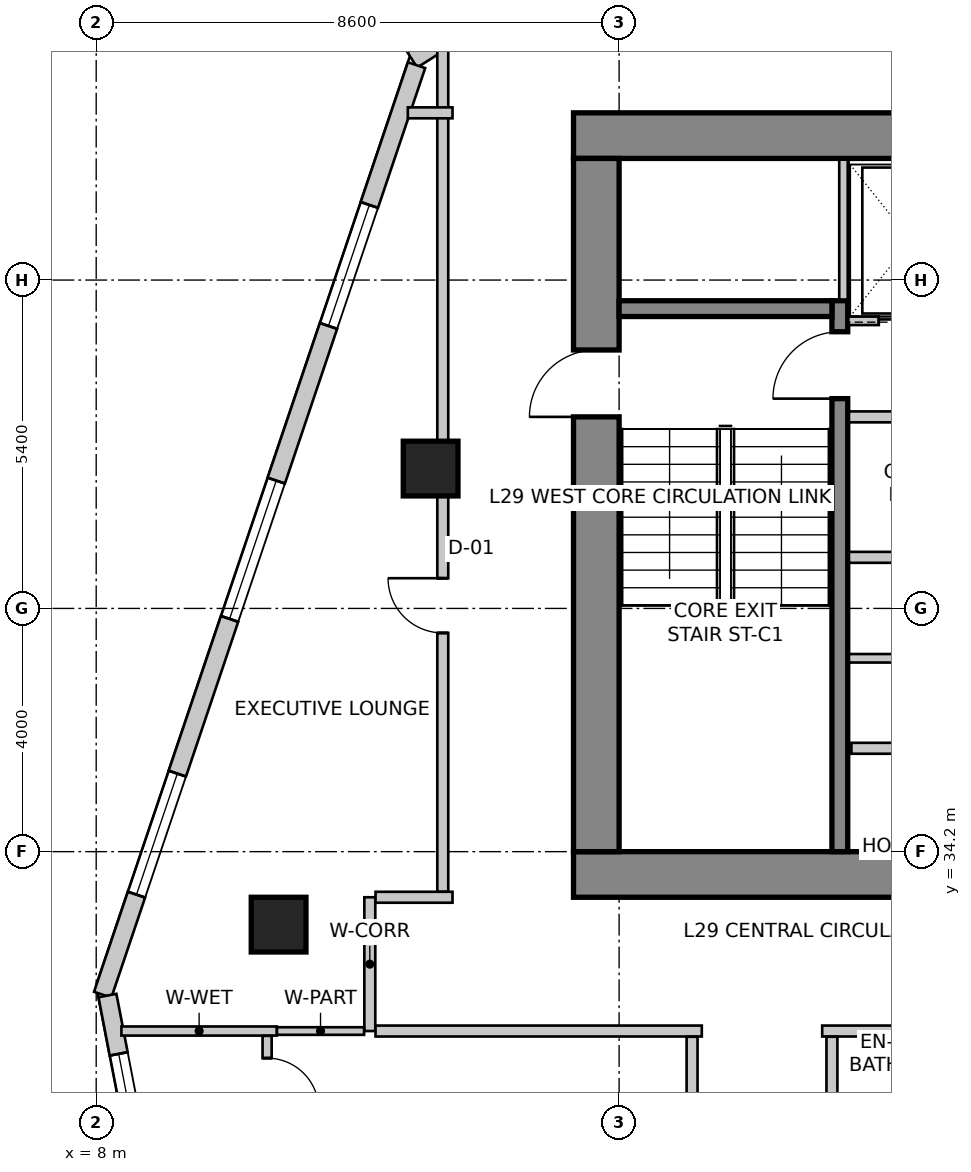
"""IFC4 building model, lengths in metres.
Left out: names, types, materials, properties, quantities, classifications, styles, units other than length and angle.
Written with IfcOpenShell. Run it as: python <this file> out.ifc"""

import sys

from ifc_helpers import new_model, si_unit, direction, frame, frame_2d, origin, origin_2d, place, context, subcontext, project, spatial, rectangle, extrude, source, transform, mapped, element, fill, save


model = new_model("IFC4")
c1 = context("Model", 3, precision=1e-05, world=origin(), true_north=direction((0.0, 1.0)))
c2 = subcontext(c1, "Body", "Model", "MODEL_VIEW")
j1 = project(units=[si_unit("LENGTHUNIT", "METRE"), si_unit("PLANEANGLEUNIT", "RADIAN")], contexts=[c1])
p1 = place(None, origin())
s1 = spatial("IfcSite", under=j1, at=p1, CompositionType="ELEMENT")
p2 = place(p1, origin())
s2 = spatial("IfcBuilding", under=s1, at=p2, CompositionType="ELEMENT")
p3 = place(p2, frame((0.0, 0.0, 121.4)))
s3 = spatial("IfcBuildingStorey", under=s2, at=p3, CompositionType="ELEMENT", Elevation=121.4)
p4 = place(p3, frame((15.85, 45.975, 0.0), z_axis=(0.0, 0.0, 1.0), x_axis=(1.0, 0.0, 0.0)))
e1 = element("IfcWall", 1, at=p4, inside=s3, PredefinedType="SHEAR", context=c2, shape_type="SweptSolid", body=[
    extrude(rectangle(XDim=15.9, YDim=0.75, at=frame_2d((7.95, 0.0))), origin(), (0.0, 0.0, 1.0), 3.6),
])
p5 = place(p3, frame((15.85, 33.825, 0.0), z_axis=(0.0, 0.0, 1.0), x_axis=(1.0, 0.0, 0.0)))
e2 = element("IfcWall", 2, at=p5, inside=s3, PredefinedType="SHEAR", context=c2, shape_type="SweptSolid", body=[
    extrude(rectangle(XDim=15.9, YDim=0.75, at=frame_2d((7.95, 0.0))), origin(), (0.0, 0.0, 1.0), 3.6),
])
m1 = source(origin(), c2, "Body", "SweptSolid", [
    extrude(rectangle(XDim=1.3, YDim=2.15, at=frame_2d((0.65, 1.075))), frame((0.0, 0.385, 0.0), z_axis=(0.0, -1.0, 0.0), x_axis=(1.0, 0.0, 0.0)), (0.0, 0.0, 1.0), 0.77),
])
p6 = place(p5, frame((10.08, 0.0, 0.0)))
e3 = element("IfcOpeningElement", 3, at=p6, cuts=e2, PredefinedType="OPENING", context=c2, shape_type="MappedRepresentation", body=[
    mapped(m1, transform((0.0, 0.0, 0.0), scale=1.0)),
])
p7 = place(p3, frame((16.225, 34.2, 0.0), z_axis=(0.0, 0.0, 1.0), x_axis=(0.0, 1.0, 0.0)))
e4 = element("IfcWall", 4, at=p7, inside=s3, PredefinedType="SHEAR", context=c2, shape_type="SweptSolid", body=[
    extrude(rectangle(XDim=11.4, YDim=0.75, at=frame_2d((5.7, 0.0))), origin(), (0.0, 0.0, 1.0), 3.6),
])
m2 = source(origin(), c2, "Body", "SweptSolid", [
    extrude(rectangle(XDim=1.1, YDim=2.15, at=frame_2d((0.55, 1.075))), frame((0.0, 0.385, 0.0), z_axis=(0.0, -1.0, 0.0), x_axis=(1.0, 0.0, 0.0)), (0.0, 0.0, 1.0), 0.77),
])
p8 = place(p7, frame((7.15, 0.0, 0.0)))
e5 = element("IfcOpeningElement", 5, at=p8, cuts=e4, PredefinedType="OPENING", context=c2, shape_type="MappedRepresentation", body=[
    mapped(m2, transform((0.0, 0.0, 0.0), scale=1.0)),
])
p9 = place(p3, frame((20.23, 34.2, 0.0), z_axis=(0.0, 0.0, 1.0), x_axis=(0.0, 1.0, 0.0)))
e6 = element("IfcWall", 6, at=p9, inside=s3, PredefinedType="SHEAR", context=c2, shape_type="SweptSolid", body=[
    extrude(rectangle(XDim=9.06, YDim=0.26, at=frame_2d((4.53, 0.0))), origin(), (0.0, 0.0, 1.0), 3.6),
])
m3 = source(origin(), c2, "Body", "SweptSolid", [
    extrude(rectangle(XDim=1.1, YDim=2.15, at=frame_2d((0.55, 1.075))), frame((0.0, 0.14, 0.0), z_axis=(0.0, -1.0, 0.0), x_axis=(1.0, 0.0, 0.0)), (0.0, 0.0, 1.0), 0.28),
])
p10 = place(p9, frame((7.45, 0.0, 0.0)))
e7 = element("IfcOpeningElement", 7, at=p10, cuts=e6, PredefinedType="OPENING", context=c2, shape_type="MappedRepresentation", body=[
    mapped(m3, transform((0.0, 0.0, 0.0), scale=1.0)),
])
p11 = place(p3, frame((16.6, 43.13, 0.0), z_axis=(0.0, 0.0, 1.0), x_axis=(1.0, 0.0, 0.0)))
e8 = element("IfcWall", 8, at=p11, inside=s3, PredefinedType="SHEAR", context=c2, shape_type="SweptSolid", body=[
    extrude(rectangle(XDim=3.5, YDim=0.26, at=frame_2d((1.75, 0.0))), origin(), (0.0, 0.0, 1.0), 3.6),
])
m4 = source(origin(), c2, "Body", "SweptSolid", [
    extrude(rectangle(XDim=0.9, YDim=0.9, at=origin_2d()), origin(), (0.0, 0.0, 1.0), 3.6),
])
for number, where, z_axis, x_axis in (
    (9, (11.0, 33.0, 0.0), (0.0, 0.0, 1.0), (1.0, 0.0, 0.0)),
    (10, (13.5, 40.5, 0.0), (0.0, 0.0, 1.0), (1.0, 0.0, 0.0)),
):
    element("IfcColumn", number, at=place(p3, frame(where, z_axis=z_axis, x_axis=x_axis)), inside=s3, PredefinedType="COLUMN", context=c2, shape_type="MappedRepresentation", body=[
        mapped(m4, transform((0.0, 0.0, 0.0), scale=1.0)),
    ])
p12 = place(p3, frame((21.875, 52.742, 0.0), z_axis=(0.0, 0.0, 1.0), x_axis=(-0.843662465249, -0.536873956092, 0.0)))
e11 = element("IfcWall", 11, at=p12, inside=s3, PredefinedType="SOLIDWALL", context=c2, shape_type="SweptSolid", body=[
    extrude(rectangle(XDim=10.284, YDim=0.3, at=frame_2d((5.142, 0.0))), origin(), (0.0, 0.0, 1.0), 3.35),
])
m5 = source(origin(), c2, "Body", "SweptSolid", [
    extrude(rectangle(XDim=2.4, YDim=2.2, at=frame_2d((1.2, 1.1))), frame((0.0, 0.16, 0.0), z_axis=(0.0, -1.0, 0.0), x_axis=(1.0, 0.0, 0.0)), (0.0, 0.0, 1.0), 0.32),
])
p13 = place(p12, frame((2.656, 0.0, 0.85)))
e12 = element("IfcOpeningElement", 12, at=p13, cuts=e11, PredefinedType="OPENING", context=c2, shape_type="MappedRepresentation", body=[
    mapped(m5, transform((0.0, 0.0, 0.0), scale=1.0)),
])
m6 = source(origin(), c2, "Body", "SweptSolid", [
    extrude(rectangle(XDim=1.5, YDim=1.8, at=frame_2d((0.75, 0.9))), frame((0.0, 0.16, 0.0), z_axis=(0.0, -1.0, 0.0), x_axis=(1.0, 0.0, 0.0)), (0.0, 0.0, 1.0), 0.32),
])
p14 = place(p12, frame((7.937, 0.0, 0.85)))
e13 = element("IfcOpeningElement", 13, at=p14, cuts=e11, PredefinedType="OPENING", context=c2, shape_type="MappedRepresentation", body=[
    mapped(m6, transform((0.0, 0.0, 0.0), scale=1.0)),
])
p15 = place(p3, frame((13.269, 47.134, 0.0), z_axis=(0.0, 0.0, 1.0), x_axis=(-0.319929596295, -0.947441319246, 0.0)))
e14 = element("IfcWall", 14, at=p15, inside=s3, PredefinedType="SOLIDWALL", context=c2, shape_type="SweptSolid", body=[
    extrude(rectangle(XDim=16.134, YDim=0.3, at=frame_2d((8.067, 0.0))), origin(), (0.0, 0.0, 1.0), 3.35),
])
m7 = source(origin(), c2, "Body", "SweptSolid", [
    extrude(rectangle(XDim=2.1, YDim=2.0, at=frame_2d((1.05, 1.0))), frame((0.0, 0.16, 0.0), z_axis=(0.0, -1.0, 0.0), x_axis=(1.0, 0.0, 0.0)), (0.0, 0.0, 1.0), 0.32),
])
p16 = place(p15, frame((2.426, 0.0, 0.85)))
e15 = element("IfcOpeningElement", 15, at=p16, cuts=e14, PredefinedType="OPENING", context=c2, shape_type="MappedRepresentation", body=[
    mapped(m7, transform((0.0, 0.0, 0.0), scale=1.0)),
])
p17 = place(p15, frame((7.211, 0.0, 0.85)))
e16 = element("IfcOpeningElement", 16, at=p17, cuts=e14, PredefinedType="OPENING", context=c2, shape_type="MappedRepresentation", body=[
    mapped(m5, transform((0.0, 0.0, 0.0), scale=1.0)),
])
p18 = place(p15, frame((12.297, 0.0, 0.85)))
e17 = element("IfcOpeningElement", 17, at=p18, cuts=e14, PredefinedType="OPENING", context=c2, shape_type="MappedRepresentation", body=[
    mapped(m7, transform((0.0, 0.0, 0.0), scale=1.0)),
])
p19 = place(p3, frame((8.185, 31.834, 0.0), z_axis=(0.0, 0.0, 1.0), x_axis=(0.189707113148, -0.981840725994, 0.0)))
e18 = element("IfcWall", 18, at=p19, inside=s3, PredefinedType="SOLIDWALL", context=c2, shape_type="SweptSolid", body=[
    extrude(rectangle(XDim=21.221, YDim=0.3, at=frame_2d((10.611, 0.0))), origin(), (0.0, 0.0, 1.0), 3.35),
])
m8 = source(origin(), c2, "Body", "SweptSolid", [
    extrude(rectangle(XDim=1.6, YDim=2.15, at=frame_2d((0.8, 1.075))), frame((0.0, 0.16, 0.0), z_axis=(0.0, -1.0, 0.0), x_axis=(1.0, 0.0, 0.0)), (0.0, 0.0, 1.0), 0.32),
])
p20 = place(p19, frame((10.441, 0.0, 0.0)))
e19 = element("IfcOpeningElement", 19, at=p20, cuts=e18, PredefinedType="OPENING", context=c2, shape_type="MappedRepresentation", body=[
    mapped(m8, transform((0.0, 0.0, 0.0), scale=1.0)),
])
p21 = place(p19, frame((0.977, 0.0, 0.85)))
e20 = element("IfcOpeningElement", 20, at=p21, cuts=e18, PredefinedType="OPENING", context=c2, shape_type="MappedRepresentation", body=[
    mapped(m6, transform((0.0, 0.0, 0.0), scale=1.0)),
])
p22 = place(p19, frame((4.219, 0.0, 0.85)))
e21 = element("IfcOpeningElement", 21, at=p22, cuts=e18, PredefinedType="OPENING", context=c2, shape_type="MappedRepresentation", body=[
    mapped(m5, transform((0.0, 0.0, 0.0), scale=1.0)),
])
p23 = place(p19, frame((8.259, 0.0, 0.85)))
e22 = element("IfcOpeningElement", 22, at=p23, cuts=e18, PredefinedType="OPENING", context=c2, shape_type="MappedRepresentation", body=[
    mapped(m6, transform((0.0, 0.0, 0.0), scale=1.0)),
])
p24 = place(p19, frame((12.842, 0.0, 0.85)))
e23 = element("IfcOpeningElement", 23, at=p24, cuts=e18, PredefinedType="OPENING", context=c2, shape_type="MappedRepresentation", body=[
    mapped(m6, transform((0.0, 0.0, 0.0), scale=1.0)),
])
p25 = place(p19, frame((16.661, 0.0, 0.85)))
e24 = element("IfcOpeningElement", 24, at=p25, cuts=e18, PredefinedType="OPENING", context=c2, shape_type="MappedRepresentation", body=[
    mapped(m5, transform((0.0, 0.0, 0.0), scale=1.0)),
])
p26 = place(p3, frame((20.37, 42.93, 0.0), z_axis=(0.0, 0.0, 1.0), x_axis=(1.0, 0.0, 0.0)))
e25 = element("IfcWall", 25, at=p26, inside=s3, PredefinedType="SOLIDWALL", context=c2, shape_type="SweptSolid", body=[
    extrude(rectangle(XDim=6.86, YDim=0.14, at=frame_2d((3.43, 0.0))), origin(), (0.0, 0.0, 1.0), 3.35),
])
m9 = source(origin(), c2, "Body", "SweptSolid", [
    extrude(rectangle(XDim=1.1, YDim=2.15, at=frame_2d((0.55, 1.075))), frame((0.0, 0.08, 0.0), z_axis=(0.0, -1.0, 0.0), x_axis=(1.0, 0.0, 0.0)), (0.0, 0.0, 1.0), 0.16),
])
p27 = place(p26, frame((0.5, 0.0, 0.0)))
e26 = element("IfcOpeningElement", 26, at=p27, cuts=e25, PredefinedType="OPENING", context=c2, shape_type="MappedRepresentation", body=[
    mapped(m9, transform((0.0, 0.0, 0.0), scale=1.0)),
])
p28 = place(p26, frame((2.7, 0.0, 0.0)))
e27 = element("IfcOpeningElement", 27, at=p28, cuts=e25, PredefinedType="OPENING", context=c2, shape_type="MappedRepresentation", body=[
    mapped(m9, transform((0.0, 0.0, 0.0), scale=1.0)),
])
p29 = place(p26, frame((5.1, 0.0, 0.0)))
e28 = element("IfcOpeningElement", 28, at=p29, cuts=e25, PredefinedType="OPENING", context=c2, shape_type="MappedRepresentation", body=[
    mapped(m9, transform((0.0, 0.0, 0.0), scale=1.0)),
])
p30 = place(p3, frame((20.29, 43.28, 0.0), z_axis=(0.0, 0.0, 1.0), x_axis=(0.0, 1.0, 0.0)))
e29 = element("IfcWall", 29, at=p30, inside=s3, PredefinedType="SOLIDWALL", context=c2, shape_type="SweptSolid", body=[
    extrude(rectangle(XDim=2.3, YDim=0.14, at=frame_2d((1.15, 0.0))), origin(), (0.0, 0.0, 1.0), 3.35),
])
p31 = place(p3, frame((20.38, 37.38, 0.0), z_axis=(0.0, 0.0, 1.0), x_axis=(1.0, 0.0, 0.0)))
e30 = element("IfcWall", 30, at=p31, inside=s3, PredefinedType="SOLIDWALL", context=c2, shape_type="SweptSolid", body=[
    extrude(rectangle(XDim=5.75, YDim=0.14, at=frame_2d((2.875, 0.0))), origin(), (0.0, 0.0, 1.0), 3.35),
])
p32 = place(p3, frame((20.38, 39.04, 0.0), z_axis=(0.0, 0.0, 1.0), x_axis=(1.0, 0.0, 0.0)))
e31 = element("IfcWall", 31, at=p32, inside=s3, PredefinedType="SOLIDWALL", context=c2, shape_type="SweptSolid", body=[
    extrude(rectangle(XDim=5.75, YDim=0.18, at=frame_2d((2.875, 0.0))), origin(), (0.0, 0.0, 1.0), 3.35),
])
p33 = place(p3, frame((24.81, 41.35, 0.0), z_axis=(0.0, 0.0, 1.0), x_axis=(-1.0, 0.0, 0.0)))
e32 = element("IfcWall", 32, at=p33, inside=s3, PredefinedType="PARTITIONING", context=c2, shape_type="SweptSolid", body=[
    extrude(rectangle(XDim=4.43, YDim=0.18, at=frame_2d((2.215, 0.0))), origin(), (0.0, 0.0, 1.0), 3.35),
])
p34 = place(p3, frame((20.42, 35.9, 0.0), z_axis=(0.0, 0.0, 1.0), x_axis=(1.0, 0.0, 0.0)))
e33 = element("IfcWall", 33, at=p34, inside=s3, PredefinedType="PARTITIONING", context=c2, shape_type="SweptSolid", body=[
    extrude(rectangle(XDim=2.62, YDim=0.18, at=frame_2d((1.31, 0.0))), origin(), (0.0, 0.0, 1.0), 3.35),
])
m10 = source(origin(), c2, "Body", "SweptSolid", [
    extrude(rectangle(XDim=0.9, YDim=2.15, at=frame_2d((0.45, 1.075))), frame((0.0, 0.1, 0.0), z_axis=(0.0, -1.0, 0.0), x_axis=(1.0, 0.0, 0.0)), (0.0, 0.0, 1.0), 0.2),
])
p35 = place(p34, frame((0.796, 0.0, 0.0)))
e34 = element("IfcOpeningElement", 34, at=p35, cuts=e33, PredefinedType="OPENING", context=c2, shape_type="MappedRepresentation", body=[
    mapped(m10, transform((0.0, 0.0, 0.0), scale=1.0)),
])
p36 = place(p3, frame((12.5, 31.25, 0.0), z_axis=(0.0, 0.0, 1.0), x_axis=(0.0, 1.0, 0.0)))
e35 = element("IfcWall", 35, at=p36, inside=s3, PredefinedType="PARTITIONING", context=c2, shape_type="SweptSolid", body=[
    extrude(rectangle(XDim=2.2, YDim=0.18, at=frame_2d((1.1, 0.0))), origin(), (0.0, 0.0, 1.0), 3.034),
])
p37 = place(p3, frame((12.594, 33.45, 0.0), z_axis=(0.0, 0.0, 1.0), x_axis=(1.0, 0.0, 0.0)))
e36 = element("IfcWall", 36, at=p37, inside=s3, PredefinedType="PARTITIONING", context=c2, shape_type="SweptSolid", body=[
    extrude(rectangle(XDim=1.266, YDim=0.18, at=frame_2d((0.633, 0.0))), origin(), (0.0, 0.0, 1.0), 3.35),
])
p38 = place(p3, frame((17.96, 31.25, 0.0), z_axis=(0.0, 0.0, 1.0), x_axis=(-1.0, 0.0, 0.0)))
e37 = element("IfcWall", 37, at=p38, inside=s3, PredefinedType="PARTITIONING", context=c2, shape_type="SweptSolid", body=[
    extrude(rectangle(XDim=5.366, YDim=0.18, at=frame_2d((2.683, 0.0))), origin(), (0.0, 0.0, 1.0), 3.034),
])
p39 = place(p3, frame((22.66, 31.25, 0.0), z_axis=(0.0, 0.0, 1.0), x_axis=(-1.0, 0.0, 0.0)))
e38 = element("IfcWall", 38, at=p39, inside=s3, PredefinedType="PARTITIONING", context=c2, shape_type="SweptSolid", body=[
    extrude(rectangle(XDim=2.72, YDim=0.18, at=frame_2d((1.36, 0.0))), origin(), (0.0, 0.0, 1.0), 3.034),
])
p40 = place(p3, frame((13.7, 33.544, 0.0), z_axis=(0.0, 0.0, 1.0), x_axis=(0.0, 1.0, 0.0)))
e39 = element("IfcWall", 39, at=p40, inside=s3, PredefinedType="PARTITIONING", context=c2, shape_type="SweptSolid", body=[
    extrude(rectangle(XDim=13.86, YDim=0.18, at=frame_2d((6.93, 0.0))), origin(), (0.0, 0.0, 1.0), 2.492),
])
p41 = place(p40, frame((4.253, 0.0, 0.0)))
e40 = element("IfcOpeningElement", 40, at=p41, cuts=e39, PredefinedType="OPENING", context=c2, shape_type="MappedRepresentation", body=[
    mapped(m10, transform((0.0, 0.0, 0.0), scale=1.0)),
])
p42 = place(p3, frame((13.86, 46.35, 0.0), z_axis=(0.0, 0.0, 1.0), x_axis=(-1.0, 0.0, 0.0)))
e41 = element("IfcWall", 41, at=p42, inside=s3, PredefinedType="PARTITIONING", context=c2, shape_type="SweptSolid", body=[
    extrude(rectangle(XDim=0.735, YDim=0.18, at=frame_2d((0.367, 0.0))), origin(), (0.0, 0.0, 1.0), 3.35),
])
p43 = place(p3, frame((10.971, 31.25, 0.0), z_axis=(0.0, 0.0, 1.0), x_axis=(-1.0, 0.0, 0.0)))
e42 = element("IfcWall", 42, at=p43, inside=s3, PredefinedType="PARTITIONING", context=c2, shape_type="SweptSolid", body=[
    extrude(rectangle(XDim=2.556, YDim=0.15, at=frame_2d((1.278, 0.0))), origin(), (0.0, 0.0, 1.0), 2.492),
])
p44 = place(p3, frame((12.406, 31.25, 0.0), z_axis=(0.0, 0.0, 1.0), x_axis=(-1.0, 0.0, 0.0)))
e43 = element("IfcWall", 43, at=p44, inside=s3, PredefinedType="PARTITIONING", context=c2, shape_type="SweptSolid", body=[
    extrude(rectangle(XDim=1.433, YDim=0.125, at=frame_2d((0.717, 0.0))), origin(), (0.0, 0.0, 1.0), 2.492),
])
p45 = place(p3, frame((17.8, 24.162, 0.0), z_axis=(0.0, 0.0, 1.0), x_axis=(0.0, 1.0, 0.0)))
e44 = element("IfcWall", 44, at=p45, inside=s3, PredefinedType="PARTITIONING", context=c2, shape_type="SweptSolid", body=[
    extrude(rectangle(XDim=6.994, YDim=0.18, at=frame_2d((3.497, 0.0))), origin(), (0.0, 0.0, 1.0), 2.803),
])
p46 = place(p45, frame((3.047, 0.0, 0.0)))
e45 = element("IfcOpeningElement", 45, at=p46, cuts=e44, PredefinedType="OPENING", context=c2, shape_type="MappedRepresentation", body=[
    mapped(m10, transform((0.0, 0.0, 0.0), scale=1.0)),
])
p47 = place(p3, frame((20.1, 31.156, 0.0), z_axis=(0.0, 0.0, 1.0), x_axis=(0.0, -1.0, 0.0)))
e46 = element("IfcWall", 46, at=p47, inside=s3, PredefinedType="PARTITIONING", context=c2, shape_type="SweptSolid", body=[
    extrude(rectangle(XDim=2.266, YDim=0.18, at=frame_2d((1.133, 0.0))), origin(), (0.0, 0.0, 1.0), 3.034),
])
p48 = place(p3, frame((10.811, 31.171, 0.0), z_axis=(0.0, 0.0, 1.0), x_axis=(0.0, -1.0, 0.0)))
e47 = element("IfcWall", 47, at=p48, inside=s3, PredefinedType="PARTITIONING", context=c2, shape_type="SweptSolid", body=[
    extrude(rectangle(XDim=2.101, YDim=0.15, at=frame_2d((1.05, 0.0))), origin(), (0.0, 0.0, 1.0), 2.492),
])
m11 = source(origin(), c2, "Body", "SweptSolid", [
    extrude(rectangle(XDim=0.85, YDim=2.15, at=frame_2d((0.425, 1.075))), frame((0.0, 0.085, 0.0), z_axis=(0.0, -1.0, 0.0), x_axis=(1.0, 0.0, 0.0)), (0.0, 0.0, 1.0), 0.17),
])
p49 = place(p48, frame((0.366, 0.0, 0.0)))
e48 = element("IfcOpeningElement", 48, at=p49, cuts=e47, PredefinedType="OPENING", context=c2, shape_type="MappedRepresentation", body=[
    mapped(m11, transform((0.0, 0.0, 0.0), scale=1.0)),
])
m12 = source(origin(), c2, "Body", "SweptSolid", [
    extrude(rectangle(XDim=2.1, YDim=2.0, at=frame_2d((1.05, 1.0))), frame((0.0, -0.015, 0.0), z_axis=(0.0, -1.0, 0.0), x_axis=(1.0, 0.0, 0.0)), (0.0, 0.0, 1.0), 0.06),
])
p50 = place(p16, origin())
e49 = element("IfcWindow", 49, at=p50, inside=s3, PartitioningType="SINGLE_PANEL", PredefinedType="WINDOW", context=c2, shape_type="MappedRepresentation", body=[
    mapped(m12, transform((0.0, 0.0, 0.0), scale=1.0)),
])
fill(e15, e49)
m13 = source(origin(), c2, "Body", "SweptSolid", [
    extrude(rectangle(XDim=2.4, YDim=2.2, at=frame_2d((1.2, 1.1))), frame((0.0, -0.015, 0.0), z_axis=(0.0, -1.0, 0.0), x_axis=(1.0, 0.0, 0.0)), (0.0, 0.0, 1.0), 0.06),
])
p51 = place(p17, origin())
e50 = element("IfcWindow", 50, at=p51, inside=s3, PartitioningType="SINGLE_PANEL", PredefinedType="WINDOW", context=c2, shape_type="MappedRepresentation", body=[
    mapped(m13, transform((0.0, 0.0, 0.0), scale=1.0)),
])
fill(e16, e50)
p52 = place(p18, origin())
e51 = element("IfcWindow", 51, at=p52, inside=s3, PartitioningType="SINGLE_PANEL", PredefinedType="WINDOW", context=c2, shape_type="MappedRepresentation", body=[
    mapped(m12, transform((0.0, 0.0, 0.0), scale=1.0)),
])
fill(e17, e51)
m14 = source(origin(), c2, "Body", "SweptSolid", [
    extrude(rectangle(XDim=1.5, YDim=1.8, at=frame_2d((0.75, 0.9))), frame((0.0, -0.015, 0.0), z_axis=(0.0, -1.0, 0.0), x_axis=(1.0, 0.0, 0.0)), (0.0, 0.0, 1.0), 0.06),
])
p53 = place(p21, origin())
e52 = element("IfcWindow", 52, at=p53, inside=s3, PartitioningType="SINGLE_PANEL", PredefinedType="WINDOW", context=c2, shape_type="MappedRepresentation", body=[
    mapped(m14, transform((0.0, 0.0, 0.0), scale=1.0)),
])
fill(e20, e52)
m15 = source(origin(), c2, "Body", "SweptSolid", [
    extrude(rectangle(XDim=1.1, YDim=2.15, at=frame_2d((0.55, 1.075))), frame((0.0, 0.025, 0.0), z_axis=(0.0, -1.0, 0.0), x_axis=(1.0, 0.0, 0.0)), (0.0, 0.0, 1.0), 0.05),
])
p54 = place(p27, origin())
e53 = element("IfcDoor", 53, at=p54, inside=s3, OperationType="SLIDING_TO_LEFT", PredefinedType="DOOR", context=c2, shape_type="MappedRepresentation", body=[
    mapped(m15, transform((0.0, 0.0, 0.0), scale=1.0)),
])
fill(e26, e53)
m16 = source(origin(), c2, "Body", "SweptSolid", [
    extrude(rectangle(XDim=1.1, YDim=2.15, at=frame_2d((0.55, 1.075))), frame((0.0, 0.025, 0.0), z_axis=(0.0, -1.0, 0.0), x_axis=(1.0, 0.0, 0.0)), (0.0, 0.0, 1.0), 0.05),
])
p55 = place(p10, origin())
e54 = element("IfcDoor", 54, at=p55, inside=s3, OperationType="SINGLE_SWING_LEFT", PredefinedType="DOOR", context=c2, shape_type="MappedRepresentation", body=[
    mapped(m16, transform((0.0, 0.0, 0.0), scale=1.0)),
])
fill(e7, e54)
p56 = place(p8, origin())
e55 = element("IfcDoor", 55, at=p56, inside=s3, OperationType="SINGLE_SWING_LEFT", PredefinedType="DOOR", context=c2, shape_type="MappedRepresentation", body=[
    mapped(m16, transform((0.0, 0.0, 0.0), scale=1.0)),
])
fill(e5, e55)
m17 = source(origin(), c2, "Body", "SweptSolid", [
    extrude(rectangle(XDim=0.9, YDim=2.15, at=frame_2d((0.45, 1.075))), frame((0.0, 0.025, 0.0), z_axis=(0.0, -1.0, 0.0), x_axis=(1.0, 0.0, 0.0)), (0.0, 0.0, 1.0), 0.05),
])
p57 = place(p41, origin())
e56 = element("IfcDoor", 56, at=p57, inside=s3, OperationType="SINGLE_SWING_RIGHT", PredefinedType="DOOR", context=c2, shape_type="MappedRepresentation", body=[
    mapped(m17, transform((0.0, 0.0, 0.0), scale=1.0)),
])
fill(e40, e56)
m18 = source(origin(), c2, "Body", "SweptSolid", [
    extrude(rectangle(XDim=0.85, YDim=2.15, at=frame_2d((0.425, 1.075))), frame((0.0, 0.025, 0.0), z_axis=(0.0, -1.0, 0.0), x_axis=(1.0, 0.0, 0.0)), (0.0, 0.0, 1.0), 0.05),
])
p58 = place(p49, origin())
e57 = element("IfcDoor", 57, at=p58, inside=s3, OperationType="SINGLE_SWING_RIGHT", PredefinedType="DOOR", context=c2, shape_type="MappedRepresentation", body=[
    mapped(m18, transform((0.0, 0.0, 0.0), scale=1.0)),
])
fill(e48, e57)
save(model, sys.argv[1])
